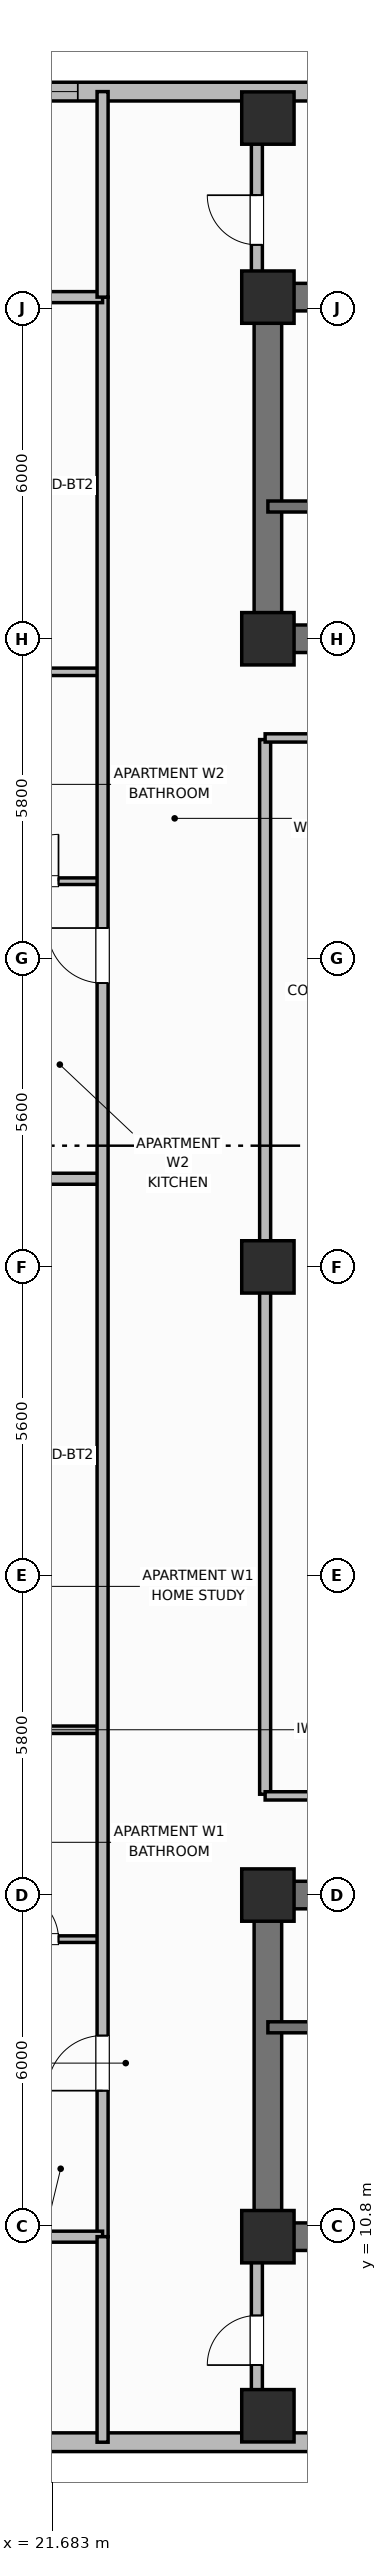
"""IFC4 building model, lengths in metres.
Left out: names, types, materials, properties, quantities, classifications, styles, units other than length and angle.
Written with IfcOpenShell. Run it as: python <this file> out.ifc"""

import sys

from ifc_helpers import new_model, si_unit, direction, frame, frame_2d, origin, origin_2d, place, context, subcontext, project, spatial, rectangle, extrude, element, fill, save


model = new_model("IFC4")
c1 = context("Model", 3, precision=1e-05, world=origin(), true_north=direction((0.0, 1.0)))
c2 = subcontext(c1, "Body", "Model", "MODEL_VIEW")
j1 = project(units=[si_unit("LENGTHUNIT", "METRE"), si_unit("PLANEANGLEUNIT", "RADIAN")], contexts=[c1])
p1 = place(None, origin())
s1 = spatial("IfcSite", under=j1, at=p1, CompositionType="ELEMENT")
p2 = place(p1, origin())
s2 = spatial("IfcBuilding", under=s1, at=p2, CompositionType="ELEMENT")
p3 = place(p2, frame((0.0, 0.0, 181.1)))
s3 = spatial("IfcBuildingStorey", under=s2, at=p3, CompositionType="ELEMENT", Elevation=181.1)
p4 = place(p3, frame((52.8, 10.6, 0.0), z_axis=(0.0, 0.0, 1.0), x_axis=(-1.0, 0.0, 0.0)))
e1 = element("IfcWall", 1, at=p4, inside=s3, PredefinedType="SHEAR", context=c2, shape_type="SweptSolid", body=[
    extrude(rectangle(XDim=27.2, YDim=0.5, at=frame_2d((13.6, 0.0))), origin(), (0.0, 0.0, 1.0), 3.7),
])
p5 = place(p3, frame((25.6, 10.85, 0.0), z_axis=(0.0, 0.0, 1.0), x_axis=(0.0, 1.0, 0.0)))
e2 = element("IfcWall", 2, at=p5, inside=s3, PredefinedType="SHEAR", context=c2, shape_type="SweptSolid", body=[
    extrude(rectangle(XDim=5.7, YDim=0.5, at=frame_2d((2.85, 0.0))), origin(), (0.0, 0.0, 1.0), 3.7),
])
p6 = place(p3, frame((25.6, 16.8, 0.0), z_axis=(0.0, 0.0, 1.0), x_axis=(1.0, 0.0, 0.0)))
e3 = element("IfcWall", 3, at=p6, inside=s3, PredefinedType="SHEAR", context=c2, shape_type="SweptSolid", body=[
    extrude(rectangle(XDim=27.2, YDim=0.5, at=frame_2d((13.6, 0.0))), origin(), (0.0, 0.0, 1.0), 3.7),
])
p7 = place(p6, frame((1.9, 0.0, 0.0)))
e4 = element("IfcOpeningElement", 4, at=p7, cuts=e3, PredefinedType="OPENING", context=c2, shape_type="SweptSolid", body=[
    extrude(rectangle(XDim=1.1, YDim=2.15, at=frame_2d((0.55, 1.075))), frame((0.0, 0.26, 0.0), z_axis=(0.0, -1.0, 0.0), x_axis=(1.0, 0.0, 0.0)), (0.0, 0.0, 1.0), 0.52),
])
p8 = place(p6, frame((13.0, 0.0, 0.0)))
e5 = element("IfcOpeningElement", 5, at=p8, cuts=e3, PredefinedType="OPENING", context=c2, shape_type="SweptSolid", body=[
    extrude(rectangle(XDim=1.2, YDim=2.15, at=frame_2d((0.6, 1.075))), frame((0.0, 0.26, 0.0), z_axis=(0.0, -1.0, 0.0), x_axis=(1.0, 0.0, 0.0)), (0.0, 0.0, 1.0), 0.52),
])
p9 = place(p6, frame((21.6, 0.0, 0.0)))
e6 = element("IfcOpeningElement", 6, at=p9, cuts=e3, PredefinedType="OPENING", context=c2, shape_type="SweptSolid", body=[
    extrude(rectangle(XDim=1.0, YDim=2.15, at=frame_2d((0.5, 1.075))), frame((0.0, 0.26, 0.0), z_axis=(0.0, -1.0, 0.0), x_axis=(1.0, 0.0, 0.0)), (0.0, 0.0, 1.0), 0.52),
])
p10 = place(p3, frame((25.6, 45.8, 0.0), z_axis=(0.0, 0.0, 1.0), x_axis=(1.0, 0.0, 0.0)))
e7 = element("IfcWall", 7, at=p10, inside=s3, PredefinedType="SHEAR", context=c2, shape_type="SweptSolid", body=[
    extrude(rectangle(XDim=27.2, YDim=0.5, at=frame_2d((13.6, 0.0))), origin(), (0.0, 0.0, 1.0), 3.7),
])
p11 = place(p3, frame((25.6, 39.85, 0.0), z_axis=(0.0, 0.0, 1.0), x_axis=(0.0, 1.0, 0.0)))
e8 = element("IfcWall", 8, at=p11, inside=s3, PredefinedType="SHEAR", context=c2, shape_type="SweptSolid", body=[
    extrude(rectangle(XDim=5.7, YDim=0.5, at=frame_2d((2.85, 0.0))), origin(), (0.0, 0.0, 1.0), 3.7),
])
p12 = place(p3, frame((52.8, 39.6, 0.0), z_axis=(0.0, 0.0, 1.0), x_axis=(-1.0, 0.0, 0.0)))
e9 = element("IfcWall", 9, at=p12, inside=s3, PredefinedType="SHEAR", context=c2, shape_type="SweptSolid", body=[
    extrude(rectangle(XDim=27.2, YDim=0.5, at=frame_2d((13.6, 0.0))), origin(), (0.0, 0.0, 1.0), 3.7),
])
p13 = place(p12, frame((24.2, 0.0, 0.0)))
e10 = element("IfcOpeningElement", 10, at=p13, cuts=e9, PredefinedType="OPENING", context=c2, shape_type="SweptSolid", body=[
    extrude(rectangle(XDim=1.1, YDim=2.15, at=frame_2d((0.55, 1.075))), frame((0.0, 0.26, 0.0), z_axis=(0.0, -1.0, 0.0), x_axis=(1.0, 0.0, 0.0)), (0.0, 0.0, 1.0), 0.52),
])
p14 = place(p12, frame((15.1, 0.0, 0.0)))
e11 = element("IfcOpeningElement", 11, at=p14, cuts=e9, PredefinedType="OPENING", context=c2, shape_type="SweptSolid", body=[
    extrude(rectangle(XDim=1.2, YDim=2.15, at=frame_2d((0.6, 1.075))), frame((0.0, 0.26, 0.0), z_axis=(0.0, -1.0, 0.0), x_axis=(1.0, 0.0, 0.0)), (0.0, 0.0, 1.0), 0.52),
])
p15 = place(p12, frame((11.6, 0.0, 0.0)))
e12 = element("IfcOpeningElement", 12, at=p15, cuts=e9, PredefinedType="OPENING", context=c2, shape_type="SweptSolid", body=[
    extrude(rectangle(XDim=0.9, YDim=2.1, at=frame_2d((0.45, 1.05))), frame((0.0, 0.26, 0.0), z_axis=(0.0, -1.0, 0.0), x_axis=(1.0, 0.0, 0.0)), (0.0, 0.0, 1.0), 0.52),
])
p16 = place(p12, frame((7.35, 0.0, 0.0)))
e13 = element("IfcOpeningElement", 13, at=p16, cuts=e9, PredefinedType="OPENING", context=c2, shape_type="SweptSolid", body=[
    extrude(rectangle(XDim=0.85, YDim=2.1, at=frame_2d((0.425, 1.05))), frame((0.0, 0.26, 0.0), z_axis=(0.0, -1.0, 0.0), x_axis=(1.0, 0.0, 0.0)), (0.0, 0.0, 1.0), 0.52),
])
p17 = place(p12, frame((3.6, 0.0, 0.0)))
e14 = element("IfcOpeningElement", 14, at=p17, cuts=e9, PredefinedType="OPENING", context=c2, shape_type="SweptSolid", body=[
    extrude(rectangle(XDim=1.0, YDim=2.15, at=frame_2d((0.5, 1.075))), frame((0.0, 0.26, 0.0), z_axis=(0.0, -1.0, 0.0), x_axis=(1.0, 0.0, 0.0)), (0.0, 0.0, 1.0), 0.52),
])
for number, where, z_axis, x_axis in (
    (15, (25.6, 10.6, 0.0), (0.0, 0.0, 1.0), (1.0, 0.0, 0.0)),
    (16, (25.6, 16.8, 0.0), (0.0, 0.0, 1.0), (1.0, 0.0, 0.0)),
    (17, (25.6, 39.6, 0.0), (0.0, 0.0, 1.0), (1.0, 0.0, 0.0)),
    (18, (25.6, 45.8, 0.0), (0.0, 0.0, 1.0), (1.0, 0.0, 0.0)),
    (19, (25.6, 28.2, 0.0), (0.0, 0.0, 1.0), (1.0, 0.0, 0.0)),
    (20, (25.6, 7.35, 0.0), (0.0, 0.0, 1.0), (1.0, 0.0, 0.0)),
    (21, (25.6, 49.05, 0.0), (0.0, 0.0, 1.0), (1.0, 0.0, 0.0)),
):
    element("IfcColumn", number, at=place(p3, frame(where, z_axis=z_axis, x_axis=x_axis)), inside=s3, PredefinedType="COLUMN", context=c2, shape_type="SweptSolid", body=[
        extrude(rectangle(XDim=0.95, YDim=0.95, at=origin_2d()), origin(), (0.0, 0.0, 1.0), 3.7),
    ])
p18 = place(p3, frame((20.2, 6.87, 0.0), z_axis=(0.0, 0.0, 1.0), x_axis=(1.0, 0.0, 0.0)))
e22 = element("IfcWall", 22, at=p18, inside=s3, PredefinedType="SOLIDWALL", context=c2, shape_type="SweptSolid", body=[
    extrude(rectangle(XDim=15.8, YDim=0.34, at=frame_2d((7.9, 0.0))), origin(), (0.0, 0.0, 1.0), 2.72),
])
p19 = place(p18, frame((8.113, 0.0, 0.75)))
e23 = element("IfcOpeningElement", 23, at=p19, cuts=e22, PredefinedType="OPENING", context=c2, shape_type="SweptSolid", body=[
    extrude(rectangle(XDim=1.8, YDim=1.85, at=frame_2d((0.9, 0.925))), frame((0.0, 0.18, 0.0), z_axis=(0.0, -1.0, 0.0), x_axis=(1.0, 0.0, 0.0)), (0.0, 0.0, 1.0), 0.36),
])
p20 = place(p18, frame((11.738, 0.0, 0.75)))
e24 = element("IfcOpeningElement", 24, at=p20, cuts=e22, PredefinedType="OPENING", context=c2, shape_type="SweptSolid", body=[
    extrude(rectangle(XDim=1.8, YDim=1.85, at=frame_2d((0.9, 0.925))), frame((0.0, 0.18, 0.0), z_axis=(0.0, -1.0, 0.0), x_axis=(1.0, 0.0, 0.0)), (0.0, 0.0, 1.0), 0.36),
])
p21 = place(p3, frame((36.0, 49.53, 0.0), z_axis=(0.0, 0.0, 1.0), x_axis=(-1.0, 0.0, 0.0)))
e25 = element("IfcWall", 25, at=p21, inside=s3, PredefinedType="SOLIDWALL", context=c2, shape_type="SweptSolid", body=[
    extrude(rectangle(XDim=15.8, YDim=0.34, at=frame_2d((7.9, 0.0))), origin(), (0.0, 0.0, 1.0), 2.72),
])
p22 = place(p21, frame((2.25, 0.0, 0.95)))
e26 = element("IfcOpeningElement", 26, at=p22, cuts=e25, PredefinedType="OPENING", context=c2, shape_type="SweptSolid", body=[
    extrude(rectangle(XDim=1.1, YDim=1.65, at=frame_2d((0.55, 0.825))), frame((0.0, 0.18, 0.0), z_axis=(0.0, -1.0, 0.0), x_axis=(1.0, 0.0, 0.0)), (0.0, 0.0, 1.0), 0.36),
])
p23 = place(p21, frame((4.8, 0.0, 0.95)))
e27 = element("IfcOpeningElement", 27, at=p23, cuts=e25, PredefinedType="OPENING", context=c2, shape_type="SweptSolid", body=[
    extrude(rectangle(XDim=1.1, YDim=1.65, at=frame_2d((0.55, 0.825))), frame((0.0, 0.18, 0.0), z_axis=(0.0, -1.0, 0.0), x_axis=(1.0, 0.0, 0.0)), (0.0, 0.0, 1.0), 0.36),
])
p24 = place(p21, frame((7.35, 0.0, 0.95)))
e28 = element("IfcOpeningElement", 28, at=p24, cuts=e25, PredefinedType="OPENING", context=c2, shape_type="SweptSolid", body=[
    extrude(rectangle(XDim=1.1, YDim=1.65, at=frame_2d((0.55, 0.825))), frame((0.0, 0.18, 0.0), z_axis=(0.0, -1.0, 0.0), x_axis=(1.0, 0.0, 0.0)), (0.0, 0.0, 1.0), 0.36),
])
p25 = place(p21, frame((13.85, 0.0, 0.95)))
e29 = element("IfcOpeningElement", 29, at=p25, cuts=e25, PredefinedType="OPENING", context=c2, shape_type="SweptSolid", body=[
    extrude(rectangle(XDim=1.1, YDim=1.65, at=frame_2d((0.55, 0.825))), frame((0.0, 0.18, 0.0), z_axis=(0.0, -1.0, 0.0), x_axis=(1.0, 0.0, 0.0)), (0.0, 0.0, 1.0), 0.36),
])
p26 = place(p3, frame((25.6, 14.4, 0.0), z_axis=(0.0, 0.0, 1.0), x_axis=(1.0, 0.0, 0.0)))
e30 = element("IfcWall", 30, at=p26, inside=s3, PredefinedType="SHEAR", context=c2, shape_type="SweptSolid", body=[
    extrude(rectangle(XDim=9.55, YDim=0.2, at=frame_2d((4.775, 0.0))), origin(), (0.0, 0.0, 1.0), 3.7),
])
p27 = place(p26, frame((1.05, 0.0, 0.0)))
e31 = element("IfcOpeningElement", 31, at=p27, cuts=e30, PredefinedType="OPENING", context=c2, shape_type="SweptSolid", body=[
    extrude(rectangle(XDim=1.1, YDim=2.15, at=frame_2d((0.55, 1.075))), frame((0.0, 0.11, 0.0), z_axis=(0.0, -1.0, 0.0), x_axis=(1.0, 0.0, 0.0)), (0.0, 0.0, 1.0), 0.22),
])
p28 = place(p3, frame((35.15, 42.0, 0.0), z_axis=(0.0, 0.0, 1.0), x_axis=(-1.0, 0.0, 0.0)))
e32 = element("IfcWall", 32, at=p28, inside=s3, PredefinedType="SHEAR", context=c2, shape_type="SweptSolid", body=[
    extrude(rectangle(XDim=9.55, YDim=0.2, at=frame_2d((4.775, 0.0))), origin(), (0.0, 0.0, 1.0), 3.7),
])
p29 = place(p28, frame((7.25, 0.0, 0.0)))
e33 = element("IfcOpeningElement", 33, at=p29, cuts=e32, PredefinedType="OPENING", context=c2, shape_type="SweptSolid", body=[
    extrude(rectangle(XDim=1.1, YDim=2.15, at=frame_2d((0.55, 1.075))), frame((0.0, 0.11, 0.0), z_axis=(0.0, -1.0, 0.0), x_axis=(1.0, 0.0, 0.0)), (0.0, 0.0, 1.0), 0.22),
])
p30 = place(p3, frame((25.55, 18.63, 0.0), z_axis=(0.0, 0.0, 1.0), x_axis=(0.0, 1.0, 0.0)))
e34 = element("IfcWall", 34, at=p30, inside=s3, PredefinedType="PARTITIONING", context=c2, shape_type="SweptSolid", body=[
    extrude(rectangle(XDim=19.14, YDim=0.2, at=frame_2d((9.57, 0.0))), origin(), (0.0, 0.0, 1.0), 2.55),
])
for number, where, z_axis, x_axis in (
    (35, (25.55, 18.6, 0.0), (0.0, 0.0, 1.0), (1.0, 0.0, 0.0)),
    (36, (25.55, 37.8, 0.0), (0.0, 0.0, 1.0), (1.0, 0.0, 0.0)),
):
    element("IfcWall", number, at=place(p3, frame(where, z_axis=z_axis, x_axis=x_axis)), inside=s3, PredefinedType="PARTITIONING", context=c2, shape_type="SweptSolid", body=[
        extrude(rectangle(XDim=3.5, YDim=0.15, at=frame_2d((1.75, 0.0))), origin(), (0.0, 0.0, 1.0), 2.55),
    ])
p31 = place(p3, frame((20.35, 16.0, 0.0), z_axis=(0.0, 0.0, 1.0), x_axis=(1.0, 0.0, 0.0)))
e37 = element("IfcWall", 37, at=p31, inside=s3, PredefinedType="PARTITIONING", context=c2, shape_type="SweptSolid", body=[
    extrude(rectangle(XDim=2.25, YDim=0.12, at=frame_2d((1.125, 0.0))), origin(), (0.0, 0.0, 1.0), 2.55),
])
p32 = place(p31, frame((0.6, 0.0, 0.0)))
e38 = element("IfcOpeningElement", 38, at=p32, cuts=e37, PredefinedType="OPENING", context=c2, shape_type="SweptSolid", body=[
    extrude(rectangle(XDim=0.85, YDim=2.1, at=frame_2d((0.425, 1.05))), frame((0.0, 0.07, 0.0), z_axis=(0.0, -1.0, 0.0), x_axis=(1.0, 0.0, 0.0)), (0.0, 0.0, 1.0), 0.14),
])
p33 = place(p3, frame((20.35, 19.8, 0.0), z_axis=(0.0, 0.0, 1.0), x_axis=(1.0, 0.0, 0.0)))
e39 = element("IfcWall", 39, at=p33, inside=s3, PredefinedType="PARTITIONING", context=c2, shape_type="SweptSolid", body=[
    extrude(rectangle(XDim=2.25, YDim=0.135, at=frame_2d((1.125, 0.0))), origin(), (0.0, 0.0, 1.0), 2.55),
])
p34 = place(p3, frame((16.97, 29.8, 0.0), z_axis=(0.0, 0.0, 1.0), x_axis=(1.0, 0.0, 0.0)))
e40 = element("IfcWall", 40, at=p34, inside=s3, PredefinedType="PARTITIONING", context=c2, shape_type="SweptSolid", body=[
    extrude(rectangle(XDim=5.63, YDim=0.2, at=frame_2d((2.815, 0.0))), origin(), (0.0, 0.0, 1.0), 2.55),
])
p35 = place(p3, frame((20.35, 35.2, 0.0), z_axis=(0.0, 0.0, 1.0), x_axis=(1.0, 0.0, 0.0)))
e41 = element("IfcWall", 41, at=p35, inside=s3, PredefinedType="PARTITIONING", context=c2, shape_type="SweptSolid", body=[
    extrude(rectangle(XDim=2.25, YDim=0.12, at=frame_2d((1.125, 0.0))), origin(), (0.0, 0.0, 1.0), 2.55),
])
p36 = place(p35, frame((0.6, 0.0, 0.0)))
e42 = element("IfcOpeningElement", 42, at=p36, cuts=e41, PredefinedType="OPENING", context=c2, shape_type="SweptSolid", body=[
    extrude(rectangle(XDim=0.85, YDim=2.1, at=frame_2d((0.425, 1.05))), frame((0.0, 0.07, 0.0), z_axis=(0.0, -1.0, 0.0), x_axis=(1.0, 0.0, 0.0)), (0.0, 0.0, 1.0), 0.14),
])
p37 = place(p3, frame((20.35, 39.0, 0.0), z_axis=(0.0, 0.0, 1.0), x_axis=(1.0, 0.0, 0.0)))
e43 = element("IfcWall", 43, at=p37, inside=s3, PredefinedType="PARTITIONING", context=c2, shape_type="SweptSolid", body=[
    extrude(rectangle(XDim=2.25, YDim=0.135, at=frame_2d((1.125, 0.0))), origin(), (0.0, 0.0, 1.0), 2.55),
])
p38 = place(p3, frame((22.6, 10.6, 0.0), z_axis=(0.0, 0.0, 1.0), x_axis=(0.0, 1.0, 0.0)))
e44 = element("IfcWall", 44, at=p38, inside=s3, PredefinedType="PARTITIONING", context=c2, shape_type="SweptSolid", body=[
    extrude(rectangle(XDim=35.2, YDim=0.2, at=frame_2d((17.6, 0.0))), origin(), (0.0, 0.0, 1.0), 2.55),
])
p39 = place(p38, frame((2.65, 0.0, 0.0)))
e45 = element("IfcOpeningElement", 45, at=p39, cuts=e44, PredefinedType="OPENING", context=c2, shape_type="SweptSolid", body=[
    extrude(rectangle(XDim=1.0, YDim=2.15, at=frame_2d((0.5, 1.075))), frame((0.0, 0.11, 0.0), z_axis=(0.0, -1.0, 0.0), x_axis=(1.0, 0.0, 0.0)), (0.0, 0.0, 1.0), 0.22),
])
p40 = place(p38, frame((22.75, 0.0, 0.0)))
e46 = element("IfcOpeningElement", 46, at=p40, cuts=e44, PredefinedType="OPENING", context=c2, shape_type="SweptSolid", body=[
    extrude(rectangle(XDim=1.0, YDim=2.15, at=frame_2d((0.5, 1.075))), frame((0.0, 0.11, 0.0), z_axis=(0.0, -1.0, 0.0), x_axis=(1.0, 0.0, 0.0)), (0.0, 0.0, 1.0), 0.22),
])
for number, where, z_axis, x_axis in (
    (47, (16.99, 10.6, 0.0), (0.0, 0.0, 1.0), (1.0, 0.0, 0.0)),
    (48, (16.99, 45.8, 0.0), (0.0, 0.0, 1.0), (1.0, 0.0, 0.0)),
):
    element("IfcWall", number, at=place(p3, frame(where, z_axis=z_axis, x_axis=x_axis)), inside=s3, PredefinedType="PARTITIONING", context=c2, shape_type="SweptSolid", body=[
        extrude(rectangle(XDim=5.61, YDim=0.2, at=frame_2d((2.805, 0.0))), origin(), (0.0, 0.0, 1.0), 2.55),
    ])
for number, where, z_axis, x_axis in (
    (49, (22.6, 6.87, 0.0), (0.0, 0.0, 1.0), (0.0, 1.0, 0.0)),
    (50, (22.6, 45.8, 0.0), (0.0, 0.0, 1.0), (0.0, 1.0, 0.0)),
):
    element("IfcWall", number, at=place(p3, frame(where, z_axis=z_axis, x_axis=x_axis)), inside=s3, PredefinedType="PARTITIONING", context=c2, shape_type="SweptSolid", body=[
        extrude(rectangle(XDim=3.73, YDim=0.2, at=frame_2d((1.865, 0.0))), origin(), (0.0, 0.0, 1.0), 2.55),
    ])
p41 = place(p3, frame((25.4, 7.62, 0.0), z_axis=(0.0, 0.0, 1.0), x_axis=(0.0, 1.0, 0.0)))
e51 = element("IfcWall", 51, at=p41, inside=s3, PredefinedType="PARTITIONING", context=c2, shape_type="SweptSolid", body=[
    extrude(rectangle(XDim=2.68, YDim=0.2, at=frame_2d((1.34, 0.0))), origin(), (0.0, 0.0, 1.0), 2.55),
])
p42 = place(p41, frame((0.65, 0.0, 0.0)))
e52 = element("IfcOpeningElement", 52, at=p42, cuts=e51, PredefinedType="OPENING", context=c2, shape_type="SweptSolid", body=[
    extrude(rectangle(XDim=0.9, YDim=2.1, at=frame_2d((0.45, 1.05))), frame((0.0, 0.11, 0.0), z_axis=(0.0, -1.0, 0.0), x_axis=(1.0, 0.0, 0.0)), (0.0, 0.0, 1.0), 0.22),
])
p43 = place(p3, frame((25.4, 46.1, 0.0), z_axis=(0.0, 0.0, 1.0), x_axis=(0.0, 1.0, 0.0)))
e53 = element("IfcWall", 53, at=p43, inside=s3, PredefinedType="PARTITIONING", context=c2, shape_type="SweptSolid", body=[
    extrude(rectangle(XDim=2.68, YDim=0.2, at=frame_2d((1.34, 0.0))), origin(), (0.0, 0.0, 1.0), 2.55),
])
p44 = place(p43, frame((0.65, 0.0, 0.0)))
e54 = element("IfcOpeningElement", 54, at=p44, cuts=e53, PredefinedType="OPENING", context=c2, shape_type="SweptSolid", body=[
    extrude(rectangle(XDim=0.9, YDim=2.1, at=frame_2d((0.45, 1.05))), frame((0.0, 0.11, 0.0), z_axis=(0.0, -1.0, 0.0), x_axis=(1.0, 0.0, 0.0)), (0.0, 0.0, 1.0), 0.22),
])
p45 = place(p25, origin())
e55 = element("IfcWindow", 55, at=p45, inside=s3, PartitioningType="SINGLE_PANEL", PredefinedType="WINDOW", context=c2, shape_type="SweptSolid", body=[
    extrude(rectangle(XDim=1.1, YDim=1.65, at=frame_2d((0.55, 0.825))), frame((0.0, 0.03, 0.0), z_axis=(0.0, -1.0, 0.0), x_axis=(1.0, 0.0, 0.0)), (0.0, 0.0, 1.0), 0.06),
])
fill(e29, e55)
p46 = place(p32, origin())
e56 = element("IfcDoor", 56, at=p46, inside=s3, OperationType="SINGLE_SWING_LEFT", PredefinedType="DOOR", context=c2, shape_type="SweptSolid", body=[
    extrude(rectangle(XDim=0.85, YDim=2.1, at=frame_2d((0.425, 1.05))), frame((0.0, 0.025, 0.0), z_axis=(0.0, -1.0, 0.0), x_axis=(1.0, 0.0, 0.0)), (0.0, 0.0, 1.0), 0.05),
])
fill(e38, e56)
p47 = place(p36, origin())
e57 = element("IfcDoor", 57, at=p47, inside=s3, OperationType="SINGLE_SWING_RIGHT", PredefinedType="DOOR", context=c2, shape_type="SweptSolid", body=[
    extrude(rectangle(XDim=0.85, YDim=2.1, at=frame_2d((0.425, 1.05))), frame((0.0, 0.025, 0.0), z_axis=(0.0, -1.0, 0.0), x_axis=(1.0, 0.0, 0.0)), (0.0, 0.0, 1.0), 0.05),
])
fill(e42, e57)
p48 = place(p39, origin())
e58 = element("IfcDoor", 58, at=p48, inside=s3, OperationType="SINGLE_SWING_LEFT", PredefinedType="DOOR", context=c2, shape_type="SweptSolid", body=[
    extrude(rectangle(XDim=1.0, YDim=2.15, at=frame_2d((0.5, 1.075))), frame((0.0, 0.025, 0.0), z_axis=(0.0, -1.0, 0.0), x_axis=(1.0, 0.0, 0.0)), (0.0, 0.0, 1.0), 0.05),
])
fill(e45, e58)
p49 = place(p40, origin())
e59 = element("IfcDoor", 59, at=p49, inside=s3, OperationType="SINGLE_SWING_RIGHT", PredefinedType="DOOR", context=c2, shape_type="SweptSolid", body=[
    extrude(rectangle(XDim=1.0, YDim=2.15, at=frame_2d((0.5, 1.075))), frame((0.0, 0.025, 0.0), z_axis=(0.0, -1.0, 0.0), x_axis=(1.0, 0.0, 0.0)), (0.0, 0.0, 1.0), 0.05),
])
fill(e46, e59)
p50 = place(p42, origin())
e60 = element("IfcDoor", 60, at=p50, inside=s3, OperationType="SINGLE_SWING_LEFT", PredefinedType="DOOR", context=c2, shape_type="SweptSolid", body=[
    extrude(rectangle(XDim=0.9, YDim=2.1, at=frame_2d((0.45, 1.05))), frame((0.0, 0.025, 0.0), z_axis=(0.0, -1.0, 0.0), x_axis=(1.0, 0.0, 0.0)), (0.0, 0.0, 1.0), 0.05),
])
fill(e52, e60)
p51 = place(p44, origin())
e61 = element("IfcDoor", 61, at=p51, inside=s3, OperationType="SINGLE_SWING_RIGHT", PredefinedType="DOOR", context=c2, shape_type="SweptSolid", body=[
    extrude(rectangle(XDim=0.9, YDim=2.1, at=frame_2d((0.45, 1.05))), frame((0.0, 0.025, 0.0), z_axis=(0.0, -1.0, 0.0), x_axis=(1.0, 0.0, 0.0)), (0.0, 0.0, 1.0), 0.05),
])
fill(e54, e61)
save(model, sys.argv[1])
